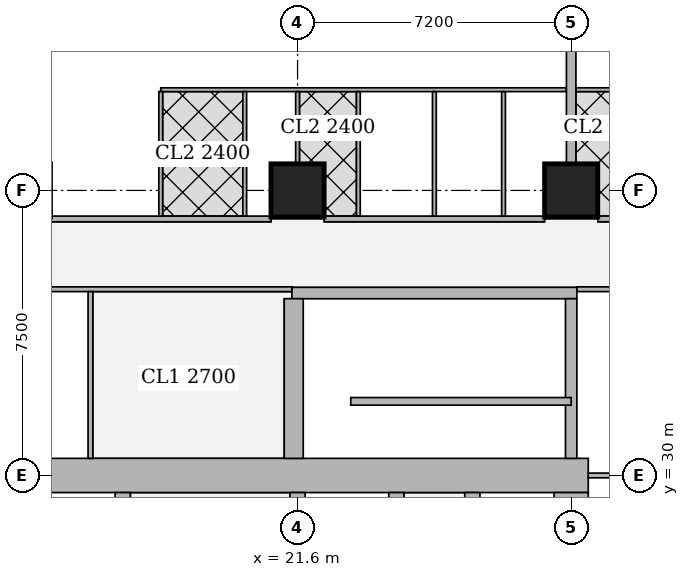
"""IFC4 building model, lengths in metres.
Left out: names, types, materials, properties, quantities, classifications, styles, units other than length and angle.
Written with IfcOpenShell. Run it as: python <this file> out.ifc"""

import sys

from ifc_helpers import new_model, si_unit, direction, frame, frame_2d, origin, origin_2d, place, context, subcontext, project, spatial, rectangle, extrude, element, fill, save


model = new_model("IFC4")
c1 = context("Model", 3, precision=1e-05, world=origin(), true_north=direction((0.0, 1.0)))
c2 = subcontext(c1, "Body", "Model", "MODEL_VIEW")
j1 = project(units=[si_unit("LENGTHUNIT", "METRE"), si_unit("PLANEANGLEUNIT", "RADIAN")], contexts=[c1])
p1 = place(None, origin())
s1 = spatial("IfcSite", under=j1, at=p1, CompositionType="ELEMENT")
p2 = place(p1, origin())
s2 = spatial("IfcBuilding", under=s1, at=p2, CompositionType="ELEMENT")
p3 = place(p2, frame((0.0, 0.0, 193.7)))
s3 = spatial("IfcBuildingStorey", under=s2, at=p3, CompositionType="ELEMENT", Elevation=193.7)
for number, where, z_axis, x_axis in (
    (1, (21.6, 37.5, 0.0), (0.0, 0.0, 1.0), (1.0, 0.0, 0.0)),
    (2, (28.8, 37.5, 0.0), (0.0, 0.0, 1.0), (1.0, 0.0, 0.0)),
):
    element("IfcColumn", number, at=place(p3, frame(where, z_axis=z_axis, x_axis=x_axis)), inside=s3, PredefinedType="COLUMN", context=c2, shape_type="SweptSolid", body=[
        extrude(rectangle(XDim=1.4, YDim=1.4, at=origin_2d()), origin(), (0.0, 0.0, 1.0), 3.75),
    ])
p4 = place(p3, frame((13.95, 30.0, 0.0), z_axis=(0.0, 0.0, 1.0), x_axis=(1.0, 0.0, 0.0)))
e3 = element("IfcWall", 3, at=p4, inside=s3, PredefinedType="SHEAR", context=c2, shape_type="SweptSolid", body=[
    extrude(rectangle(XDim=15.3, YDim=0.9, at=frame_2d((7.65, 0.0))), origin(), (0.0, 0.0, 1.0), 3.75),
])
p5 = place(p4, frame((4.45, 0.0, 0.0)))
e4 = element("IfcOpeningElement", 4, at=p5, cuts=e3, PredefinedType="OPENING", context=c2, shape_type="SweptSolid", body=[
    extrude(rectangle(XDim=1.8, YDim=2.1, at=frame_2d((0.9, 1.05))), frame((0.0, 0.46, 0.0), z_axis=(0.0, -1.0, 0.0), x_axis=(1.0, 0.0, 0.0)), (0.0, 0.0, 1.0), 0.92),
])
p6 = place(p4, frame((10.7, 0.0, 0.0)))
e5 = element("IfcOpeningElement", 5, at=p6, cuts=e3, PredefinedType="OPENING", context=c2, shape_type="SweptSolid", body=[
    extrude(rectangle(XDim=1.1, YDim=2.1, at=frame_2d((0.55, 1.05))), frame((0.0, 0.46, 0.0), z_axis=(0.0, -1.0, 0.0), x_axis=(1.0, 0.0, 0.0)), (0.0, 0.0, 1.0), 0.92),
])
p7 = place(p3, frame((28.8, 15.45, 0.0), z_axis=(0.0, 0.0, 1.0), x_axis=(0.0, 1.0, 0.0)))
e6 = element("IfcWall", 6, at=p7, inside=s3, PredefinedType="SHEAR", context=c2, shape_type="SweptSolid", body=[
    extrude(rectangle(XDim=14.1, YDim=0.9, at=frame_2d((7.05, 0.0))), origin(), (0.0, 0.0, 1.0), 3.75),
])
p8 = place(p3, frame((17.0, 15.45, 0.0), z_axis=(0.0, 0.0, 1.0), x_axis=(0.0, 1.0, 0.0)))
e7 = element("IfcWall", 7, at=p8, inside=s3, PredefinedType="SHEAR", context=c2, shape_type="SweptSolid", body=[
    extrude(rectangle(XDim=14.1, YDim=0.4, at=frame_2d((7.05, 0.0))), origin(), (0.0, 0.0, 1.0), 3.75),
])
p9 = place(p8, frame((0.925, 0.0, 0.0)))
e8 = element("IfcOpeningElement", 8, at=p9, cuts=e7, PredefinedType="OPENING", context=c2, shape_type="SweptSolid", body=[
    extrude(rectangle(XDim=1.0, YDim=2.1, at=frame_2d((0.5, 1.05))), frame((0.0, 0.21, 0.0), z_axis=(0.0, -1.0, 0.0), x_axis=(1.0, 0.0, 0.0)), (0.0, 0.0, 1.0), 0.42),
])
p10 = place(p8, frame((4.675, 0.0, 0.0)))
e9 = element("IfcOpeningElement", 9, at=p10, cuts=e7, PredefinedType="OPENING", context=c2, shape_type="SweptSolid", body=[
    extrude(rectangle(XDim=1.0, YDim=2.1, at=frame_2d((0.5, 1.05))), frame((0.0, 0.21, 0.0), z_axis=(0.0, -1.0, 0.0), x_axis=(1.0, 0.0, 0.0)), (0.0, 0.0, 1.0), 0.42),
])
p11 = place(p8, frame((8.425, 0.0, 0.0)))
e10 = element("IfcOpeningElement", 10, at=p11, cuts=e7, PredefinedType="OPENING", context=c2, shape_type="SweptSolid", body=[
    extrude(rectangle(XDim=1.0, YDim=2.1, at=frame_2d((0.5, 1.05))), frame((0.0, 0.21, 0.0), z_axis=(0.0, -1.0, 0.0), x_axis=(1.0, 0.0, 0.0)), (0.0, 0.0, 1.0), 0.42),
])
p12 = place(p8, frame((12.175, 0.0, 0.0)))
e11 = element("IfcOpeningElement", 11, at=p12, cuts=e7, PredefinedType="OPENING", context=c2, shape_type="SweptSolid", body=[
    extrude(rectangle(XDim=1.0, YDim=2.1, at=frame_2d((0.5, 1.05))), frame((0.0, 0.21, 0.0), z_axis=(0.0, -1.0, 0.0), x_axis=(1.0, 0.0, 0.0)), (0.0, 0.0, 1.0), 0.42),
])
p13 = place(p3, frame((21.6, 15.45, 0.0), z_axis=(0.0, 0.0, 1.0), x_axis=(0.0, 1.0, 0.0)))
e12 = element("IfcWall", 12, at=p13, inside=s3, PredefinedType="SHEAR", context=c2, shape_type="SweptSolid", body=[
    extrude(rectangle(XDim=14.1, YDim=0.4, at=frame_2d((7.05, 0.0))), origin(), (0.0, 0.0, 1.0), 3.75),
])
p14 = place(p13, frame((0.875, 0.0, 0.0)))
e13 = element("IfcOpeningElement", 13, at=p14, cuts=e12, PredefinedType="OPENING", context=c2, shape_type="SweptSolid", body=[
    extrude(rectangle(XDim=1.1, YDim=2.1, at=frame_2d((0.55, 1.05))), frame((0.0, 0.21, 0.0), z_axis=(0.0, -1.0, 0.0), x_axis=(1.0, 0.0, 0.0)), (0.0, 0.0, 1.0), 0.42),
])
p15 = place(p13, frame((4.625, 0.0, 0.0)))
e14 = element("IfcOpeningElement", 14, at=p15, cuts=e12, PredefinedType="OPENING", context=c2, shape_type="SweptSolid", body=[
    extrude(rectangle(XDim=1.1, YDim=2.1, at=frame_2d((0.55, 1.05))), frame((0.0, 0.21, 0.0), z_axis=(0.0, -1.0, 0.0), x_axis=(1.0, 0.0, 0.0)), (0.0, 0.0, 1.0), 0.42),
])
p16 = place(p13, frame((8.375, 0.0, 0.0)))
e15 = element("IfcOpeningElement", 15, at=p16, cuts=e12, PredefinedType="OPENING", context=c2, shape_type="SweptSolid", body=[
    extrude(rectangle(XDim=1.1, YDim=2.1, at=frame_2d((0.55, 1.05))), frame((0.0, 0.21, 0.0), z_axis=(0.0, -1.0, 0.0), x_axis=(1.0, 0.0, 0.0)), (0.0, 0.0, 1.0), 0.42),
])
p17 = place(p13, frame((12.125, 0.0, 0.0)))
e16 = element("IfcOpeningElement", 16, at=p17, cuts=e12, PredefinedType="OPENING", context=c2, shape_type="SweptSolid", body=[
    extrude(rectangle(XDim=1.1, YDim=2.1, at=frame_2d((0.55, 1.05))), frame((0.0, 0.21, 0.0), z_axis=(0.0, -1.0, 0.0), x_axis=(1.0, 0.0, 0.0)), (0.0, 0.0, 1.0), 0.42),
])
p18 = place(p3, frame((24.2, 15.45, 0.0), z_axis=(0.0, 0.0, 1.0), x_axis=(0.0, 1.0, 0.0)))
e17 = element("IfcWall", 17, at=p18, inside=s3, PredefinedType="SHEAR", context=c2, shape_type="SweptSolid", body=[
    extrude(rectangle(XDim=14.1, YDim=0.4, at=frame_2d((7.05, 0.0))), origin(), (0.0, 0.0, 1.0), 3.75),
])
p19 = place(p3, frame((26.2, 26.45, 0.0), z_axis=(0.0, 0.0, 1.0), x_axis=(0.0, 1.0, 0.0)))
e18 = element("IfcWall", 18, at=p19, inside=s3, PredefinedType="SHEAR", context=c2, shape_type="SweptSolid", body=[
    extrude(rectangle(XDim=3.1, YDim=0.4, at=frame_2d((1.55, 0.0))), origin(), (0.0, 0.0, 1.0), 3.75),
])
p20 = place(p19, frame((1.075, 0.0, 0.0)))
e19 = element("IfcOpeningElement", 19, at=p20, cuts=e18, PredefinedType="OPENING", context=c2, shape_type="SweptSolid", body=[
    extrude(rectangle(XDim=1.2, YDim=2.1, at=frame_2d((0.6, 1.05))), frame((0.0, 0.21, 0.0), z_axis=(0.0, -1.0, 0.0), x_axis=(1.0, 0.0, 0.0)), (0.0, 0.0, 1.0), 0.42),
])
p21 = place(p3, frame((21.45, 34.8, 0.0), z_axis=(0.0, 0.0, 1.0), x_axis=(1.0, 0.0, 0.0)))
e20 = element("IfcWall", 20, at=p21, inside=s3, PredefinedType="SHEAR", context=c2, shape_type="SweptSolid", body=[
    extrude(rectangle(XDim=7.5, YDim=0.3, at=frame_2d((3.75, 0.0))), origin(), (0.0, 0.0, 1.0), 3.75),
])
p22 = place(p21, frame((0.5, 0.0, 0.0)))
e21 = element("IfcOpeningElement", 21, at=p22, cuts=e20, PredefinedType="OPENING", context=c2, shape_type="SweptSolid", body=[
    extrude(rectangle(XDim=1.1, YDim=2.1, at=frame_2d((0.55, 1.05))), frame((0.0, 0.16, 0.0), z_axis=(0.0, -1.0, 0.0), x_axis=(1.0, 0.0, 0.0)), (0.0, 0.0, 1.0), 0.32),
])
p23 = place(p3, frame((21.5, 30.45, 0.0), z_axis=(0.0, 0.0, 1.0), x_axis=(0.0, 1.0, 0.0)))
e22 = element("IfcWall", 22, at=p23, inside=s3, PredefinedType="SHEAR", context=c2, shape_type="SweptSolid", body=[
    extrude(rectangle(XDim=4.2, YDim=0.5, at=frame_2d((2.1, 0.0))), origin(), (0.0, 0.0, 1.0), 3.75),
])
p24 = place(p3, frame((28.8, 30.45, 0.0), z_axis=(0.0, 0.0, 1.0), x_axis=(0.0, 1.0, 0.0)))
e23 = element("IfcWall", 23, at=p24, inside=s3, PredefinedType="SHEAR", context=c2, shape_type="SweptSolid", body=[
    extrude(rectangle(XDim=4.2, YDim=0.3, at=frame_2d((2.1, 0.0))), origin(), (0.0, 0.0, 1.0), 3.75),
])
p25 = place(p3, frame((15.101, 36.75, 0.0), z_axis=(0.0, 0.0, 1.0), x_axis=(1.0, 0.0, 0.0)))
e24 = element("IfcWall", 24, at=p25, inside=s3, PredefinedType="SOLIDWALL", context=c2, shape_type="SweptSolid", body=[
    extrude(rectangle(XDim=5.798, YDim=0.15, at=frame_2d((2.899, 0.0))), origin(), (0.0, 0.0, 1.0), 3.5),
])
p26 = place(p25, frame((0.799, 0.0, 0.0)))
e25 = element("IfcOpeningElement", 25, at=p26, cuts=e24, PredefinedType="OPENING", context=c2, shape_type="SweptSolid", body=[
    extrude(rectangle(XDim=1.0, YDim=2.1, at=frame_2d((0.5, 1.05))), frame((0.0, 0.085, 0.0), z_axis=(0.0, -1.0, 0.0), x_axis=(1.0, 0.0, 0.0)), (0.0, 0.0, 1.0), 0.17),
])
p27 = place(p3, frame((22.301, 36.75, 0.0), z_axis=(0.0, 0.0, 1.0), x_axis=(1.0, 0.0, 0.0)))
e26 = element("IfcWall", 26, at=p27, inside=s3, PredefinedType="SOLIDWALL", context=c2, shape_type="SweptSolid", body=[
    extrude(rectangle(XDim=5.798, YDim=0.15, at=frame_2d((2.899, 0.0))), origin(), (0.0, 0.0, 1.0), 3.5),
])
p28 = place(p3, frame((29.501, 36.75, 0.0), z_axis=(0.0, 0.0, 1.0), x_axis=(1.0, 0.0, 0.0)))
e27 = element("IfcWall", 27, at=p28, inside=s3, PredefinedType="SOLIDWALL", context=c2, shape_type="SweptSolid", body=[
    extrude(rectangle(XDim=5.471, YDim=0.15, at=frame_2d((2.735, 0.0))), origin(), (0.0, 0.0, 1.0), 3.5),
])
p29 = place(p28, frame((2.945, 0.0, 0.0)))
e28 = element("IfcOpeningElement", 28, at=p29, cuts=e27, PredefinedType="OPENING", context=c2, shape_type="SweptSolid", body=[
    extrude(rectangle(XDim=1.0, YDim=2.1, at=frame_2d((0.5, 1.05))), frame((0.0, 0.085, 0.0), z_axis=(0.0, -1.0, 0.0), x_axis=(1.0, 0.0, 0.0)), (0.0, 0.0, 1.0), 0.17),
])
p30 = place(p3, frame((18.0, 40.15, 0.0), z_axis=(0.0, 0.0, 1.0), x_axis=(1.0, 0.0, 0.0)))
e29 = element("IfcWall", 29, at=p30, inside=s3, PredefinedType="PARTITIONING", context=c2, shape_type="SweptSolid", body=[
    extrude(rectangle(XDim=10.675, YDim=0.1, at=frame_2d((5.337, 0.0))), origin(), (0.0, 0.0, 1.0), 3.5),
])
p31 = place(p30, frame((0.655, 0.0, 0.0)))
e30 = element("IfcOpeningElement", 30, at=p31, cuts=e29, PredefinedType="OPENING", context=c2, shape_type="SweptSolid", body=[
    extrude(rectangle(XDim=0.9, YDim=2.1, at=frame_2d((0.45, 1.05))), frame((0.0, 0.06, 0.0), z_axis=(0.0, -1.0, 0.0), x_axis=(1.0, 0.0, 0.0)), (0.0, 0.0, 1.0), 0.12),
])
p32 = place(p30, frame((3.95, 0.0, 0.0)))
e31 = element("IfcOpeningElement", 31, at=p32, cuts=e29, PredefinedType="OPENING", context=c2, shape_type="SweptSolid", body=[
    extrude(rectangle(XDim=0.9, YDim=2.1, at=frame_2d((0.45, 1.05))), frame((0.0, 0.06, 0.0), z_axis=(0.0, -1.0, 0.0), x_axis=(1.0, 0.0, 0.0)), (0.0, 0.0, 1.0), 0.12),
])
p33 = place(p30, frame((7.66, 0.0, 0.0)))
e32 = element("IfcOpeningElement", 32, at=p33, cuts=e29, PredefinedType="OPENING", context=c2, shape_type="SweptSolid", body=[
    extrude(rectangle(XDim=0.9, YDim=2.1, at=frame_2d((0.45, 1.05))), frame((0.0, 0.06, 0.0), z_axis=(0.0, -1.0, 0.0), x_axis=(1.0, 0.0, 0.0)), (0.0, 0.0, 1.0), 0.12),
])
p34 = place(p30, frame((2.455, 0.0, 0.0)))
e33 = element("IfcOpeningElement", 33, at=p34, cuts=e29, PredefinedType="OPENING", context=c2, shape_type="SweptSolid", body=[
    extrude(rectangle(XDim=0.9, YDim=2.1, at=frame_2d((0.45, 1.05))), frame((0.0, 0.06, 0.0), z_axis=(0.0, -1.0, 0.0), x_axis=(1.0, 0.0, 0.0)), (0.0, 0.0, 1.0), 0.12),
])
p35 = place(p30, frame((5.75, 0.0, 0.0)))
e34 = element("IfcOpeningElement", 34, at=p35, cuts=e29, PredefinedType="OPENING", context=c2, shape_type="SweptSolid", body=[
    extrude(rectangle(XDim=0.9, YDim=2.1, at=frame_2d((0.45, 1.05))), frame((0.0, 0.06, 0.0), z_axis=(0.0, -1.0, 0.0), x_axis=(1.0, 0.0, 0.0)), (0.0, 0.0, 1.0), 0.12),
])
p36 = place(p30, frame((9.46, 0.0, 0.0)))
e35 = element("IfcOpeningElement", 35, at=p36, cuts=e29, PredefinedType="OPENING", context=c2, shape_type="SweptSolid", body=[
    extrude(rectangle(XDim=0.9, YDim=2.1, at=frame_2d((0.45, 1.05))), frame((0.0, 0.06, 0.0), z_axis=(0.0, -1.0, 0.0), x_axis=(1.0, 0.0, 0.0)), (0.0, 0.0, 1.0), 0.12),
])
p37 = place(p3, frame((18.0, 36.825, 0.0), z_axis=(0.0, 0.0, 1.0), x_axis=(0.0, 1.0, 0.0)))
e36 = element("IfcWall", 36, at=p37, inside=s3, PredefinedType="PARTITIONING", context=c2, shape_type="SweptSolid", body=[
    extrude(rectangle(XDim=3.275, YDim=0.1, at=frame_2d((1.638, 0.0))), origin(), (0.0, 0.0, 1.0), 3.5),
])
p38 = place(p3, frame((21.6, 38.201, 0.0), z_axis=(0.0, 0.0, 1.0), x_axis=(0.0, 1.0, 0.0)))
e37 = element("IfcWall", 37, at=p38, inside=s3, PredefinedType="PARTITIONING", context=c2, shape_type="SweptSolid", body=[
    extrude(rectangle(XDim=1.899, YDim=0.1, at=frame_2d((0.95, 0.0))), origin(), (0.0, 0.0, 1.0), 3.5),
])
for number, where, z_axis, x_axis in (
    (38, (25.2, 36.825, 0.0), (0.0, 0.0, 1.0), (0.0, 1.0, 0.0)),
    (39, (20.21, 36.825, 0.0), (0.0, 0.0, 1.0), (0.0, 1.0, 0.0)),
    (40, (23.2, 36.825, 0.0), (0.0, 0.0, 1.0), (0.0, 1.0, 0.0)),
    (41, (27.02, 36.825, 0.0), (0.0, 0.0, 1.0), (0.0, 1.0, 0.0)),
):
    element("IfcWall", number, at=place(p3, frame(where, z_axis=z_axis, x_axis=x_axis)), inside=s3, PredefinedType="PARTITIONING", context=c2, shape_type="SweptSolid", body=[
        extrude(rectangle(XDim=3.275, YDim=0.1, at=frame_2d((1.638, 0.0))), origin(), (0.0, 0.0, 1.0), 3.5),
    ])
p39 = place(p3, frame((28.925, 40.15, 0.0), z_axis=(0.0, 0.0, 1.0), x_axis=(1.0, 0.0, 0.0)))
e42 = element("IfcWall", 42, at=p39, inside=s3, PredefinedType="PARTITIONING", context=c2, shape_type="SweptSolid", body=[
    extrude(rectangle(XDim=1.904, YDim=0.1, at=frame_2d((0.952, 0.0))), origin(), (0.0, 0.0, 1.0), 3.5),
])
p40 = place(p39, frame((0.425, 0.0, 0.0)))
e43 = element("IfcOpeningElement", 43, at=p40, cuts=e42, PredefinedType="OPENING", context=c2, shape_type="SweptSolid", body=[
    extrude(rectangle(XDim=0.9, YDim=2.1, at=frame_2d((0.45, 1.05))), frame((0.0, 0.06, 0.0), z_axis=(0.0, -1.0, 0.0), x_axis=(1.0, 0.0, 0.0)), (0.0, 0.0, 1.0), 0.12),
])
p41 = place(p3, frame((28.8, 38.201, 0.0), z_axis=(0.0, 0.0, 1.0), x_axis=(0.0, 1.0, 0.0)))
e44 = element("IfcWall", 44, at=p41, inside=s3, PredefinedType="SOLIDWALL", context=c2, shape_type="SweptSolid", body=[
    extrude(rectangle(XDim=3.149, YDim=0.25, at=frame_2d((1.575, 0.0))), origin(), (0.0, 0.0, 1.0), 3.5),
])
p42 = place(p3, frame((10.713, 34.9, 0.0), z_axis=(0.0, 0.0, 1.0), x_axis=(1.0, 0.0, 0.0)))
e45 = element("IfcWall", 45, at=p42, inside=s3, PredefinedType="PARTITIONING", context=c2, shape_type="SweptSolid", body=[
    extrude(rectangle(XDim=10.737, YDim=0.125, at=frame_2d((5.369, 0.0))), origin(), (0.0, 0.0, 1.0), 3.5),
])
p43 = place(p42, frame((7.187, 0.0, 0.0)))
e46 = element("IfcOpeningElement", 46, at=p43, cuts=e45, PredefinedType="OPENING", context=c2, shape_type="SweptSolid", body=[
    extrude(rectangle(XDim=1.8, YDim=2.1, at=frame_2d((0.9, 1.05))), frame((0.0, 0.073, 0.0), z_axis=(0.0, -1.0, 0.0), x_axis=(1.0, 0.0, 0.0)), (0.0, 0.0, 1.0), 0.145),
])
p44 = place(p3, frame((16.15, 30.45, 0.0), z_axis=(0.0, 0.0, 1.0), x_axis=(0.0, 1.0, 0.0)))
e47 = element("IfcWall", 47, at=p44, inside=s3, PredefinedType="PARTITIONING", context=c2, shape_type="SweptSolid", body=[
    extrude(rectangle(XDim=4.387, YDim=0.125, at=frame_2d((2.193, 0.0))), origin(), (0.0, 0.0, 1.0), 3.5),
])
p45 = place(p44, frame((1.75, 0.0, 0.0)))
e48 = element("IfcOpeningElement", 48, at=p45, cuts=e47, PredefinedType="OPENING", context=c2, shape_type="SweptSolid", body=[
    extrude(rectangle(XDim=1.0, YDim=2.1, at=frame_2d((0.5, 1.05))), frame((0.0, 0.073, 0.0), z_axis=(0.0, -1.0, 0.0), x_axis=(1.0, 0.0, 0.0)), (0.0, 0.0, 1.0), 0.145),
])
p46 = place(p3, frame((28.95, 34.9, 0.0), z_axis=(0.0, 0.0, 1.0), x_axis=(1.0, 0.0, 0.0)))
e49 = element("IfcWall", 49, at=p46, inside=s3, PredefinedType="PARTITIONING", context=c2, shape_type="SweptSolid", body=[
    extrude(rectangle(XDim=4.588, YDim=0.125, at=frame_2d((2.294, 0.0))), origin(), (0.0, 0.0, 1.0), 3.5),
])
p47 = place(p3, frame((29.25, 30.0, 0.0), z_axis=(0.0, 0.0, 1.0), x_axis=(1.0, 0.0, 0.0)))
e50 = element("IfcWall", 50, at=p47, inside=s3, PredefinedType="PARTITIONING", context=c2, shape_type="SweptSolid", body=[
    extrude(rectangle(XDim=3.049, YDim=0.125, at=frame_2d((1.524, 0.0))), origin(), (0.0, 0.0, 1.0), 3.5),
])
p48 = place(p3, frame((23.0, 31.95, 0.0), z_axis=(0.0, 0.0, 1.0), x_axis=(1.0, 0.0, 0.0)))
e51 = element("IfcWall", 51, at=p48, inside=s3, PredefinedType="SHEAR", context=c2, shape_type="SweptSolid", body=[
    extrude(rectangle(XDim=5.8, YDim=0.2, at=frame_2d((2.9, 0.0))), origin(), (0.0, 0.0, 1.0), 3.75),
])
p49 = place(p31, origin())
e52 = element("IfcDoor", 52, at=p49, inside=s3, OperationType="SINGLE_SWING_RIGHT", PredefinedType="DOOR", context=c2, shape_type="SweptSolid", body=[
    extrude(rectangle(XDim=0.9, YDim=2.1, at=frame_2d((0.45, 1.05))), frame((0.0, 0.025, 0.0), z_axis=(0.0, -1.0, 0.0), x_axis=(1.0, 0.0, 0.0)), (0.0, 0.0, 1.0), 0.05),
])
fill(e30, e52)
p50 = place(p32, origin())
e53 = element("IfcDoor", 53, at=p50, inside=s3, OperationType="SINGLE_SWING_RIGHT", PredefinedType="DOOR", context=c2, shape_type="SweptSolid", body=[
    extrude(rectangle(XDim=0.9, YDim=2.1, at=frame_2d((0.45, 1.05))), frame((0.0, 0.025, 0.0), z_axis=(0.0, -1.0, 0.0), x_axis=(1.0, 0.0, 0.0)), (0.0, 0.0, 1.0), 0.05),
])
fill(e31, e53)
p51 = place(p33, origin())
e54 = element("IfcDoor", 54, at=p51, inside=s3, OperationType="SINGLE_SWING_RIGHT", PredefinedType="DOOR", context=c2, shape_type="SweptSolid", body=[
    extrude(rectangle(XDim=0.9, YDim=2.1, at=frame_2d((0.45, 1.05))), frame((0.0, 0.025, 0.0), z_axis=(0.0, -1.0, 0.0), x_axis=(1.0, 0.0, 0.0)), (0.0, 0.0, 1.0), 0.05),
])
fill(e32, e54)
p52 = place(p34, origin())
e55 = element("IfcDoor", 55, at=p52, inside=s3, OperationType="SINGLE_SWING_LEFT", PredefinedType="DOOR", context=c2, shape_type="SweptSolid", body=[
    extrude(rectangle(XDim=0.9, YDim=2.1, at=frame_2d((0.45, 1.05))), frame((0.0, 0.025, 0.0), z_axis=(0.0, -1.0, 0.0), x_axis=(1.0, 0.0, 0.0)), (0.0, 0.0, 1.0), 0.05),
])
fill(e33, e55)
p53 = place(p35, origin())
e56 = element("IfcDoor", 56, at=p53, inside=s3, OperationType="SINGLE_SWING_LEFT", PredefinedType="DOOR", context=c2, shape_type="SweptSolid", body=[
    extrude(rectangle(XDim=0.9, YDim=2.1, at=frame_2d((0.45, 1.05))), frame((0.0, 0.025, 0.0), z_axis=(0.0, -1.0, 0.0), x_axis=(1.0, 0.0, 0.0)), (0.0, 0.0, 1.0), 0.05),
])
fill(e34, e56)
p54 = place(p36, origin())
e57 = element("IfcDoor", 57, at=p54, inside=s3, OperationType="SINGLE_SWING_LEFT", PredefinedType="DOOR", context=c2, shape_type="SweptSolid", body=[
    extrude(rectangle(XDim=0.9, YDim=2.1, at=frame_2d((0.45, 1.05))), frame((0.0, 0.025, 0.0), z_axis=(0.0, -1.0, 0.0), x_axis=(1.0, 0.0, 0.0)), (0.0, 0.0, 1.0), 0.05),
])
fill(e35, e57)
p55 = place(p26, origin())
e58 = element("IfcDoor", 58, at=p55, inside=s3, OperationType="SINGLE_SWING_LEFT", PredefinedType="DOOR", context=c2, shape_type="SweptSolid", body=[
    extrude(rectangle(XDim=1.0, YDim=2.1, at=frame_2d((0.5, 1.05))), frame((0.0, 0.025, 0.0), z_axis=(0.0, -1.0, 0.0), x_axis=(1.0, 0.0, 0.0)), (0.0, 0.0, 1.0), 0.05),
])
fill(e25, e58)
p56 = place(p40, origin())
e59 = element("IfcDoor", 59, at=p56, inside=s3, OperationType="SINGLE_SWING_RIGHT", PredefinedType="DOOR", context=c2, shape_type="SweptSolid", body=[
    extrude(rectangle(XDim=0.9, YDim=2.1, at=frame_2d((0.45, 1.05))), frame((0.0, 0.025, 0.0), z_axis=(0.0, -1.0, 0.0), x_axis=(1.0, 0.0, 0.0)), (0.0, 0.0, 1.0), 0.05),
])
fill(e43, e59)
p57 = place(p45, origin())
e60 = element("IfcDoor", 60, at=p57, inside=s3, OperationType="SINGLE_SWING_RIGHT", PredefinedType="DOOR", context=c2, shape_type="SweptSolid", body=[
    extrude(rectangle(XDim=1.0, YDim=2.1, at=frame_2d((0.5, 1.05))), frame((0.0, 0.025, 0.0), z_axis=(0.0, -1.0, 0.0), x_axis=(1.0, 0.0, 0.0)), (0.0, 0.0, 1.0), 0.05),
])
fill(e48, e60)
p58 = place(p43, origin())
e61 = element("IfcDoor", 61, at=p58, inside=s3, OperationType="DOUBLE_DOOR_SINGLE_SWING", PredefinedType="DOOR", context=c2, shape_type="SweptSolid", body=[
    extrude(rectangle(XDim=1.8, YDim=2.1, at=frame_2d((0.9, 1.05))), frame((0.0, 0.025, 0.0), z_axis=(0.0, -1.0, 0.0), x_axis=(1.0, 0.0, 0.0)), (0.0, 0.0, 1.0), 0.05),
])
fill(e46, e61)
p59 = place(p5, origin())
e62 = element("IfcDoor", 62, at=p59, inside=s3, OperationType="DOUBLE_DOOR_SINGLE_SWING", PredefinedType="DOOR", context=c2, shape_type="SweptSolid", body=[
    extrude(rectangle(XDim=1.8, YDim=2.1, at=frame_2d((0.9, 1.05))), frame((0.0, 0.025, 0.0), z_axis=(0.0, -1.0, 0.0), x_axis=(1.0, 0.0, 0.0)), (0.0, 0.0, 1.0), 0.05),
])
fill(e4, e62)
p60 = place(p6, origin())
e63 = element("IfcDoor", 63, at=p60, inside=s3, OperationType="SINGLE_SWING_LEFT", PredefinedType="DOOR", context=c2, shape_type="SweptSolid", body=[
    extrude(rectangle(XDim=1.1, YDim=2.1, at=frame_2d((0.55, 1.05))), frame((0.0, 0.025, 0.0), z_axis=(0.0, -1.0, 0.0), x_axis=(1.0, 0.0, 0.0)), (0.0, 0.0, 1.0), 0.05),
])
fill(e5, e63)
p61 = place(p22, origin())
e64 = element("IfcDoor", 64, at=p61, inside=s3, OperationType="SINGLE_SWING_RIGHT", PredefinedType="DOOR", context=c2, shape_type="SweptSolid", body=[
    extrude(rectangle(XDim=1.1, YDim=2.1, at=frame_2d((0.55, 1.05))), frame((0.0, 0.025, 0.0), z_axis=(0.0, -1.0, 0.0), x_axis=(1.0, 0.0, 0.0)), (0.0, 0.0, 1.0), 0.05),
])
fill(e21, e64)
save(model, sys.argv[1])
